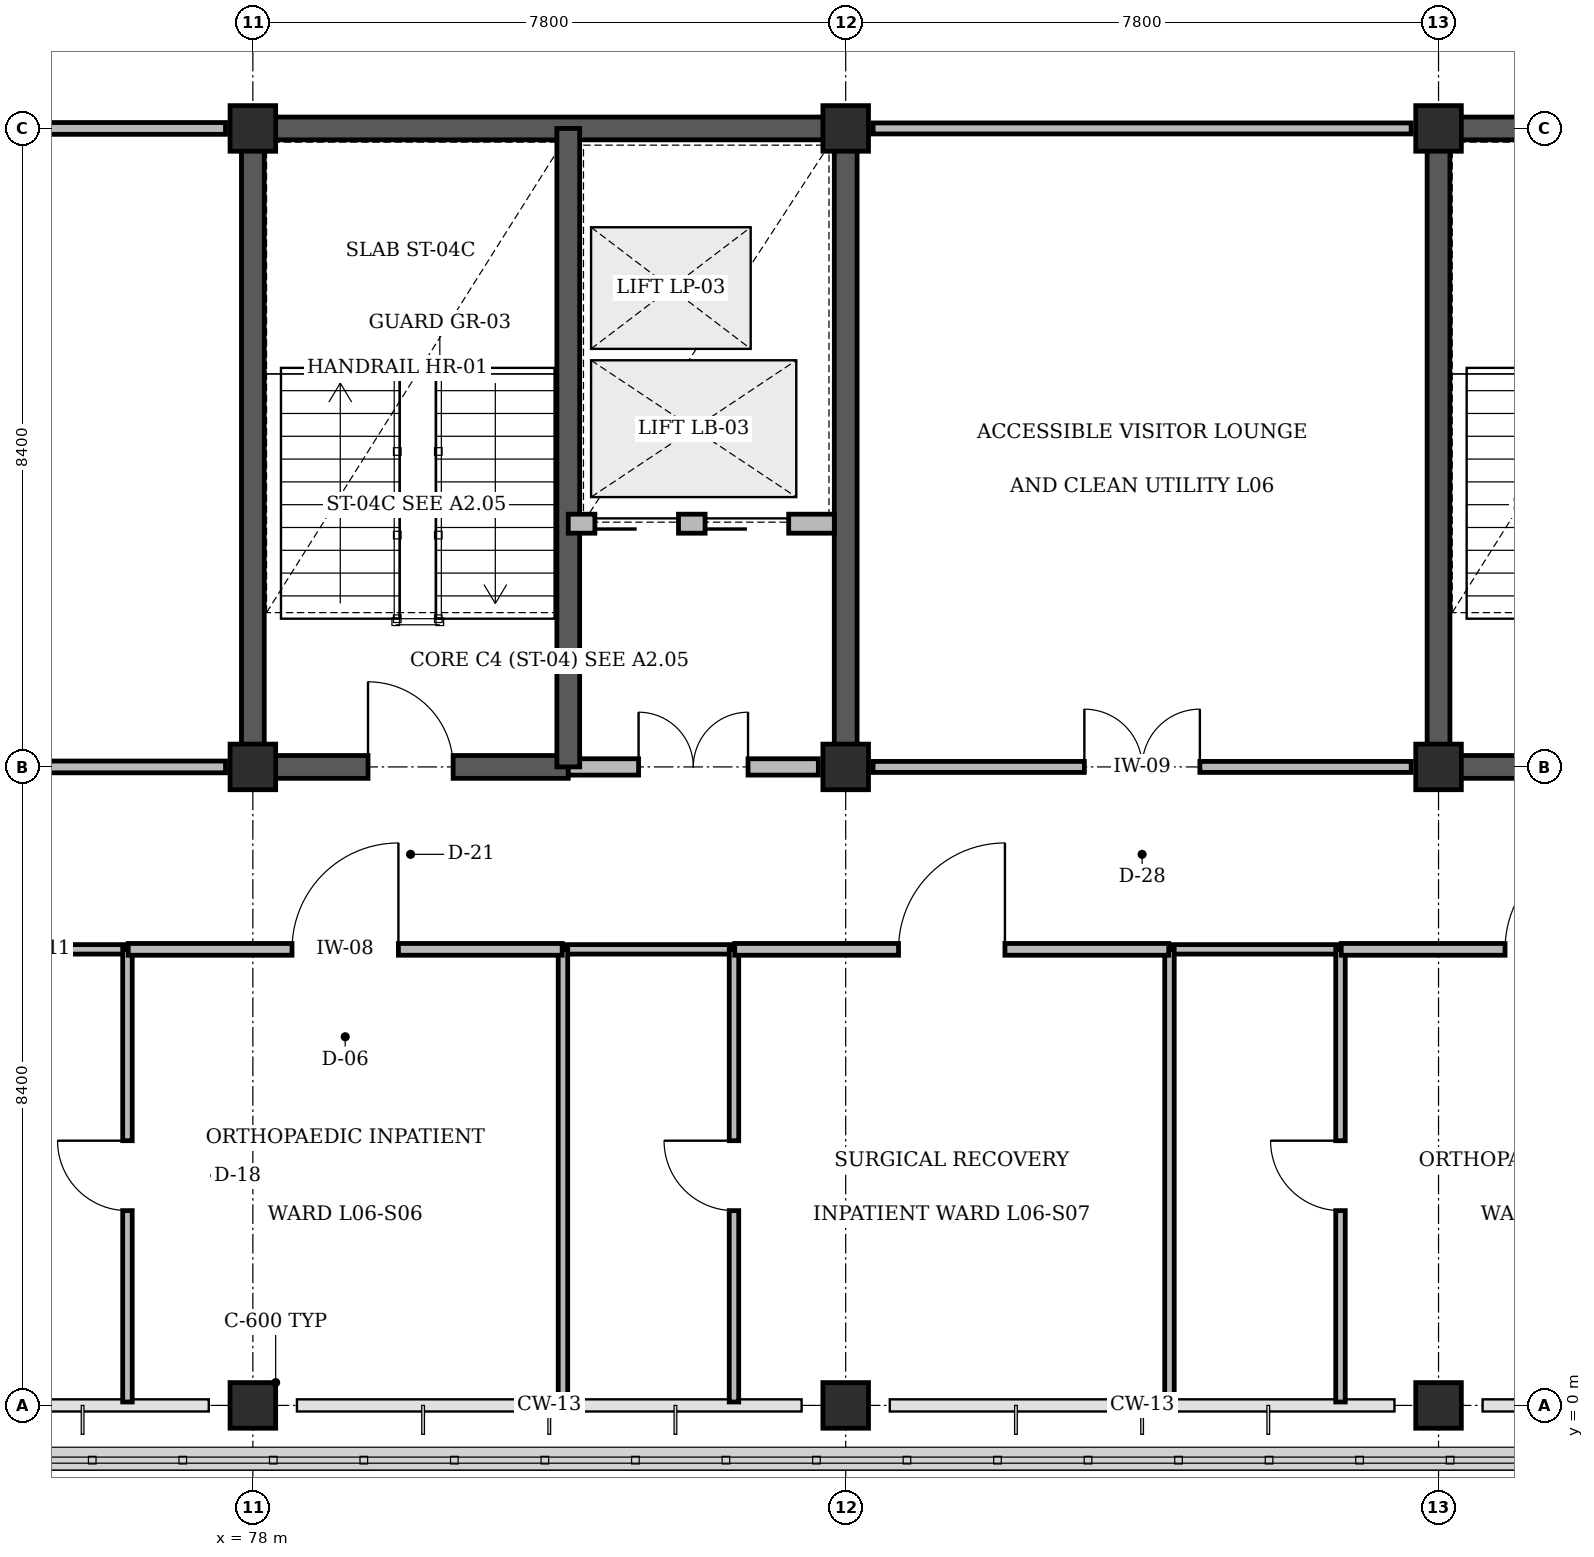
"""IFC4 building model, lengths in metres.
Left out: names, types, materials, properties, quantities, classifications, styles, units other than length and angle.
Written with IfcOpenShell. Run it as: python <this file> out.ifc"""

import sys

from ifc_helpers import new_model, si_unit, direction, frame, frame_2d, origin, origin_2d, place, context, subcontext, project, spatial, rectangle, extrude, element, fill, save


model = new_model("IFC4")
c1 = context("Model", 3, precision=1e-05, world=origin(), true_north=direction((0.0, 1.0)))
c2 = subcontext(c1, "Body", "Model", "MODEL_VIEW")
j1 = project(units=[si_unit("LENGTHUNIT", "METRE"), si_unit("PLANEANGLEUNIT", "RADIAN")], contexts=[c1])
p1 = place(None, origin())
s1 = spatial("IfcSite", under=j1, at=p1, CompositionType="ELEMENT")
p2 = place(p1, origin())
s2 = spatial("IfcBuilding", under=s1, at=p2, CompositionType="ELEMENT")
p3 = place(p2, frame((0.0, 0.0, 26.4)))
s3 = spatial("IfcBuildingStorey", under=s2, at=p3, CompositionType="ELEMENT", Elevation=26.4)
p4 = place(p3, frame((77.85, 16.8, 0.0), z_axis=(0.0, 0.0, 1.0), x_axis=(1.0, 0.0, 0.0)))
e1 = element("IfcWall", 1, at=p4, inside=s3, PredefinedType="SHEAR", context=c2, shape_type="SweptSolid", body=[
    extrude(rectangle(XDim=8.1, YDim=0.3, at=frame_2d((4.05, 0.0))), origin(), (0.0, 0.0, 1.0), 3.92),
])
for number, where, z_axis, x_axis in (
    (2, (78.0, 8.4, 0.0), (0.0, 0.0, 1.0), (0.0, 1.0, 0.0)),
    (3, (85.8, 8.4, 0.0), (0.0, 0.0, 1.0), (0.0, 1.0, 0.0)),
):
    element("IfcWall", number, at=place(p3, frame(where, z_axis=z_axis, x_axis=x_axis)), inside=s3, PredefinedType="SHEAR", context=c2, shape_type="SweptSolid", body=[
        extrude(rectangle(XDim=8.4, YDim=0.3, at=frame_2d((4.2, 0.0))), origin(), (0.0, 0.0, 1.0), 3.92),
    ])
p5 = place(p3, frame((93.45, 16.8, 0.0), z_axis=(0.0, 0.0, 1.0), x_axis=(1.0, 0.0, 0.0)))
e4 = element("IfcWall", 4, at=p5, inside=s3, PredefinedType="SHEAR", context=c2, shape_type="SweptSolid", body=[
    extrude(rectangle(XDim=8.1, YDim=0.3, at=frame_2d((4.05, 0.0))), origin(), (0.0, 0.0, 1.0), 3.92),
])
p6 = place(p3, frame((93.6, 8.4, 0.0), z_axis=(0.0, 0.0, 1.0), x_axis=(0.0, 1.0, 0.0)))
e5 = element("IfcWall", 5, at=p6, inside=s3, PredefinedType="SHEAR", context=c2, shape_type="SweptSolid", body=[
    extrude(rectangle(XDim=8.4, YDim=0.3, at=frame_2d((4.2, 0.0))), origin(), (0.0, 0.0, 1.0), 3.92),
])
for number, where, z_axis, x_axis in (
    (6, (78.0, 0.0, 0.0), (0.0, 0.0, 1.0), (1.0, 0.0, 0.0)),
    (7, (78.0, 8.4, 0.0), (0.0, 0.0, 1.0), (1.0, 0.0, 0.0)),
    (8, (78.0, 16.8, 0.0), (0.0, 0.0, 1.0), (1.0, 0.0, 0.0)),
    (9, (85.8, 0.0, 0.0), (0.0, 0.0, 1.0), (1.0, 0.0, 0.0)),
    (10, (85.8, 8.4, 0.0), (0.0, 0.0, 1.0), (1.0, 0.0, 0.0)),
    (11, (85.8, 16.8, 0.0), (0.0, 0.0, 1.0), (1.0, 0.0, 0.0)),
    (12, (93.6, 0.0, 0.0), (0.0, 0.0, 1.0), (1.0, 0.0, 0.0)),
    (13, (93.6, 8.4, 0.0), (0.0, 0.0, 1.0), (1.0, 0.0, 0.0)),
    (14, (93.6, 16.8, 0.0), (0.0, 0.0, 1.0), (1.0, 0.0, 0.0)),
):
    element("IfcColumn", number, at=place(p3, frame(where, z_axis=z_axis, x_axis=x_axis)), inside=s3, PredefinedType="COLUMN", context=c2, shape_type="SweptSolid", body=[
        extrude(rectangle(XDim=0.6, YDim=0.6, at=origin_2d()), origin(), (0.0, 0.0, 1.0), 4.2),
    ])
p7 = place(p3, frame((78.0, 8.4, 0.0), z_axis=(0.0, 0.0, 1.0), x_axis=(1.0, 0.0, 0.0)))
e15 = element("IfcWall", 15, at=p7, inside=s3, PredefinedType="SHEAR", context=c2, shape_type="SweptSolid", body=[
    extrude(rectangle(XDim=4.15, YDim=0.3, at=frame_2d((2.075, 0.0))), origin(), (0.0, 0.0, 1.0), 4.2),
])
p8 = place(p7, frame((1.515, 0.0, 0.0)))
e16 = element("IfcOpeningElement", 16, at=p8, cuts=e15, PredefinedType="OPENING", context=c2, shape_type="SweptSolid", body=[
    extrude(rectangle(XDim=1.12, YDim=2.15, at=frame_2d((0.56, 1.075))), frame((0.0, 0.16, 0.0), z_axis=(0.0, -1.0, 0.0), x_axis=(1.0, 0.0, 0.0)), (0.0, 0.0, 1.0), 0.32),
])
p9 = place(p3, frame((82.15, 8.4, 0.0), z_axis=(0.0, 0.0, 1.0), x_axis=(1.0, 0.0, 0.0)))
e17 = element("IfcWall", 17, at=p9, inside=s3, PredefinedType="STANDARD", context=c2, shape_type="SweptSolid", body=[
    extrude(rectangle(XDim=3.29, YDim=0.215, at=frame_2d((1.645, 0.0))), origin(), (0.0, 0.0, 1.0), 3.27),
])
p10 = place(p9, frame((0.925, 0.0, 0.0)))
e18 = element("IfcOpeningElement", 18, at=p10, cuts=e17, PredefinedType="OPENING", context=c2, shape_type="SweptSolid", body=[
    extrude(rectangle(XDim=1.44, YDim=2.2, at=frame_2d((0.72, 1.1))), frame((0.0, 0.118, 0.0), z_axis=(0.0, -1.0, 0.0), x_axis=(1.0, 0.0, 0.0)), (0.0, 0.0, 1.0), 0.235),
])
p11 = place(p3, frame((82.15, 8.4, 0.0), z_axis=(0.0, 0.0, 1.0), x_axis=(0.0, 1.0, 0.0)))
e19 = element("IfcWall", 19, at=p11, inside=s3, PredefinedType="SHEAR", context=c2, shape_type="SweptSolid", body=[
    extrude(rectangle(XDim=8.4, YDim=0.3, at=frame_2d((4.2, 0.0))), origin(), (0.0, 0.0, 1.0), 4.2),
])
p12 = place(p3, frame((82.15, 11.6, 0.0), z_axis=(0.0, 0.0, 1.0), x_axis=(1.0, 0.0, 0.0)))
e20 = element("IfcWall", 20, at=p12, inside=s3, PredefinedType="STANDARD", context=c2, shape_type="SweptSolid", body=[
    extrude(rectangle(XDim=3.5, YDim=0.25, at=frame_2d((1.75, 0.0))), origin(), (0.0, 0.0, 1.0), 3.9),
])
p13 = place(p12, frame((0.35, 0.0, 0.0)))
e21 = element("IfcOpeningElement", 21, at=p13, cuts=e20, PredefinedType="OPENING", context=c2, shape_type="SweptSolid", body=[
    extrude(rectangle(XDim=1.1, YDim=2.2, at=frame_2d((0.55, 1.1))), frame((0.0, 0.135, 0.0), z_axis=(0.0, -1.0, 0.0), x_axis=(1.0, 0.0, 0.0)), (0.0, 0.0, 1.0), 0.27),
])
p14 = place(p12, frame((1.8, 0.0, 0.0)))
e22 = element("IfcOpeningElement", 22, at=p14, cuts=e20, PredefinedType="OPENING", context=c2, shape_type="SweptSolid", body=[
    extrude(rectangle(XDim=1.1, YDim=2.2, at=frame_2d((0.55, 1.1))), frame((0.0, 0.135, 0.0), z_axis=(0.0, -1.0, 0.0), x_axis=(1.0, 0.0, 0.0)), (0.0, 0.0, 1.0), 0.27),
])
p15 = place(p3, frame((93.6, 8.4, 0.0), z_axis=(0.0, 0.0, 1.0), x_axis=(1.0, 0.0, 0.0)))
e23 = element("IfcWall", 23, at=p15, inside=s3, PredefinedType="SHEAR", context=c2, shape_type="SweptSolid", body=[
    extrude(rectangle(XDim=4.15, YDim=0.3, at=frame_2d((2.075, 0.0))), origin(), (0.0, 0.0, 1.0), 4.2),
])
p16 = place(p15, frame((1.515, 0.0, 0.0)))
e24 = element("IfcOpeningElement", 24, at=p16, cuts=e23, PredefinedType="OPENING", context=c2, shape_type="SweptSolid", body=[
    extrude(rectangle(XDim=1.12, YDim=2.15, at=frame_2d((0.56, 1.075))), frame((0.0, 0.16, 0.0), z_axis=(0.0, -1.0, 0.0), x_axis=(1.0, 0.0, 0.0)), (0.0, 0.0, 1.0), 0.32),
])
p17 = place(p3, frame((74.1, 6.0, 0.0), z_axis=(0.0, 0.0, 1.0), x_axis=(1.0, 0.0, 0.0)))
e25 = element("IfcWall", 25, at=p17, inside=s3, PredefinedType="PARTITIONING", context=c2, shape_type="SweptSolid", body=[
    extrude(rectangle(XDim=2.25, YDim=0.125, at=frame_2d((1.125, 0.0))), origin(), (0.0, 0.0, 1.0), 3.9),
])
p18 = place(p3, frame((76.35, 0.045, 0.0), z_axis=(0.0, 0.0, 1.0), x_axis=(0.0, 1.0, 0.0)))
e26 = element("IfcWall", 26, at=p18, inside=s3, PredefinedType="PARTITIONING", context=c2, shape_type="SweptSolid", body=[
    extrude(rectangle(XDim=5.955, YDim=0.125, at=frame_2d((2.978, 0.0))), origin(), (0.0, 0.0, 1.0), 3.9),
])
p19 = place(p18, frame((2.518, 0.0, 0.0)))
e27 = element("IfcOpeningElement", 27, at=p19, cuts=e26, PredefinedType="OPENING", context=c2, shape_type="SweptSolid", body=[
    extrude(rectangle(XDim=0.92, YDim=2.1, at=frame_2d((0.46, 1.05))), frame((0.0, 0.073, 0.0), z_axis=(0.0, -1.0, 0.0), x_axis=(1.0, 0.0, 0.0)), (0.0, 0.0, 1.0), 0.145),
])
p20 = place(p3, frame((82.08, 6.0, 0.0), z_axis=(0.0, 0.0, 1.0), x_axis=(1.0, 0.0, 0.0)))
e28 = element("IfcWall", 28, at=p20, inside=s3, PredefinedType="PARTITIONING", context=c2, shape_type="SweptSolid", body=[
    extrude(rectangle(XDim=2.25, YDim=0.125, at=frame_2d((1.125, 0.0))), origin(), (0.0, 0.0, 1.0), 3.9),
])
p21 = place(p3, frame((82.08, 0.045, 0.0), z_axis=(0.0, 0.0, 1.0), x_axis=(0.0, 1.0, 0.0)))
e29 = element("IfcWall", 29, at=p21, inside=s3, PredefinedType="PARTITIONING", context=c2, shape_type="SweptSolid", body=[
    extrude(rectangle(XDim=5.955, YDim=0.125, at=frame_2d((2.978, 0.0))), origin(), (0.0, 0.0, 1.0), 3.9),
])
p22 = place(p3, frame((84.33, 0.045, 0.0), z_axis=(0.0, 0.0, 1.0), x_axis=(0.0, 1.0, 0.0)))
e30 = element("IfcWall", 30, at=p22, inside=s3, PredefinedType="PARTITIONING", context=c2, shape_type="SweptSolid", body=[
    extrude(rectangle(XDim=5.955, YDim=0.125, at=frame_2d((2.978, 0.0))), origin(), (0.0, 0.0, 1.0), 3.9),
])
p23 = place(p22, frame((2.518, 0.0, 0.0)))
e31 = element("IfcOpeningElement", 31, at=p23, cuts=e30, PredefinedType="OPENING", context=c2, shape_type="SweptSolid", body=[
    extrude(rectangle(XDim=0.92, YDim=2.1, at=frame_2d((0.46, 1.05))), frame((0.0, 0.073, 0.0), z_axis=(0.0, -1.0, 0.0), x_axis=(1.0, 0.0, 0.0)), (0.0, 0.0, 1.0), 0.145),
])
p24 = place(p3, frame((90.06, 6.0, 0.0), z_axis=(0.0, 0.0, 1.0), x_axis=(1.0, 0.0, 0.0)))
e32 = element("IfcWall", 32, at=p24, inside=s3, PredefinedType="PARTITIONING", context=c2, shape_type="SweptSolid", body=[
    extrude(rectangle(XDim=2.25, YDim=0.125, at=frame_2d((1.125, 0.0))), origin(), (0.0, 0.0, 1.0), 3.9),
])
p25 = place(p3, frame((90.06, 0.045, 0.0), z_axis=(0.0, 0.0, 1.0), x_axis=(0.0, 1.0, 0.0)))
e33 = element("IfcWall", 33, at=p25, inside=s3, PredefinedType="PARTITIONING", context=c2, shape_type="SweptSolid", body=[
    extrude(rectangle(XDim=5.955, YDim=0.125, at=frame_2d((2.978, 0.0))), origin(), (0.0, 0.0, 1.0), 3.9),
])
p26 = place(p3, frame((92.31, 0.045, 0.0), z_axis=(0.0, 0.0, 1.0), x_axis=(0.0, 1.0, 0.0)))
e34 = element("IfcWall", 34, at=p26, inside=s3, PredefinedType="PARTITIONING", context=c2, shape_type="SweptSolid", body=[
    extrude(rectangle(XDim=5.955, YDim=0.125, at=frame_2d((2.978, 0.0))), origin(), (0.0, 0.0, 1.0), 3.9),
])
p27 = place(p26, frame((2.518, 0.0, 0.0)))
e35 = element("IfcOpeningElement", 35, at=p27, cuts=e34, PredefinedType="OPENING", context=c2, shape_type="SweptSolid", body=[
    extrude(rectangle(XDim=0.92, YDim=2.1, at=frame_2d((0.46, 1.05))), frame((0.0, 0.073, 0.0), z_axis=(0.0, -1.0, 0.0), x_axis=(1.0, 0.0, 0.0)), (0.0, 0.0, 1.0), 0.145),
])
p28 = place(p3, frame((76.36, 6.0, 0.0), z_axis=(0.0, 0.0, 1.0), x_axis=(1.0, 0.0, 0.0)))
e36 = element("IfcWall", 36, at=p28, inside=s3, PredefinedType="PARTITIONING", context=c2, shape_type="SweptSolid", body=[
    extrude(rectangle(XDim=5.71, YDim=0.155, at=frame_2d((2.855, 0.0))), origin(), (0.0, 0.0, 1.0), 3.9),
])
p29 = place(p28, frame((2.155, 0.0, 0.0)))
e37 = element("IfcOpeningElement", 37, at=p29, cuts=e36, PredefinedType="OPENING", context=c2, shape_type="SweptSolid", body=[
    extrude(rectangle(XDim=1.4, YDim=2.2, at=frame_2d((0.7, 1.1))), frame((0.0, 0.087, 0.0), z_axis=(0.0, -1.0, 0.0), x_axis=(1.0, 0.0, 0.0)), (0.0, 0.0, 1.0), 0.175),
])
p30 = place(p3, frame((84.34, 6.0, 0.0), z_axis=(0.0, 0.0, 1.0), x_axis=(1.0, 0.0, 0.0)))
e38 = element("IfcWall", 38, at=p30, inside=s3, PredefinedType="PARTITIONING", context=c2, shape_type="SweptSolid", body=[
    extrude(rectangle(XDim=5.71, YDim=0.155, at=frame_2d((2.855, 0.0))), origin(), (0.0, 0.0, 1.0), 3.9),
])
p31 = place(p30, frame((2.155, 0.0, 0.0)))
e39 = element("IfcOpeningElement", 39, at=p31, cuts=e38, PredefinedType="OPENING", context=c2, shape_type="SweptSolid", body=[
    extrude(rectangle(XDim=1.4, YDim=2.2, at=frame_2d((0.7, 1.1))), frame((0.0, 0.087, 0.0), z_axis=(0.0, -1.0, 0.0), x_axis=(1.0, 0.0, 0.0)), (0.0, 0.0, 1.0), 0.175),
])
p32 = place(p3, frame((92.32, 6.0, 0.0), z_axis=(0.0, 0.0, 1.0), x_axis=(1.0, 0.0, 0.0)))
e40 = element("IfcWall", 40, at=p32, inside=s3, PredefinedType="PARTITIONING", context=c2, shape_type="SweptSolid", body=[
    extrude(rectangle(XDim=5.71, YDim=0.155, at=frame_2d((2.855, 0.0))), origin(), (0.0, 0.0, 1.0), 3.9),
])
p33 = place(p32, frame((2.155, 0.0, 0.0)))
e41 = element("IfcOpeningElement", 41, at=p33, cuts=e40, PredefinedType="OPENING", context=c2, shape_type="SweptSolid", body=[
    extrude(rectangle(XDim=1.4, YDim=2.2, at=frame_2d((0.7, 1.1))), frame((0.0, 0.087, 0.0), z_axis=(0.0, -1.0, 0.0), x_axis=(1.0, 0.0, 0.0)), (0.0, 0.0, 1.0), 0.175),
])
for number, where, z_axis, x_axis in (
    (42, (73.2, 8.4, 0.0), (0.0, 0.0, 1.0), (1.0, 0.0, 0.0)),
    (43, (73.2, 16.8, 0.0), (0.0, 0.0, 1.0), (1.0, 0.0, 0.0)),
):
    element("IfcWall", number, at=place(p3, frame(where, z_axis=z_axis, x_axis=x_axis)), inside=s3, PredefinedType="PARTITIONING", context=c2, shape_type="SweptSolid", body=[
        extrude(rectangle(XDim=4.44, YDim=0.155, at=frame_2d((2.22, 0.0))), origin(), (0.0, 0.0, 1.0), 3.27),
    ])
p34 = place(p3, frame((86.16, 8.4, 0.0), z_axis=(0.0, 0.0, 1.0), x_axis=(1.0, 0.0, 0.0)))
e44 = element("IfcWall", 44, at=p34, inside=s3, PredefinedType="PARTITIONING", context=c2, shape_type="SweptSolid", body=[
    extrude(rectangle(XDim=7.08, YDim=0.145, at=frame_2d((3.54, 0.0))), origin(), (0.0, 0.0, 1.0), 3.27),
])
p35 = place(p34, frame((2.78, 0.0, 0.0)))
e45 = element("IfcOpeningElement", 45, at=p35, cuts=e44, PredefinedType="OPENING", context=c2, shape_type="SweptSolid", body=[
    extrude(rectangle(XDim=1.52, YDim=2.2, at=frame_2d((0.76, 1.1))), frame((0.0, 0.083, 0.0), z_axis=(0.0, -1.0, 0.0), x_axis=(1.0, 0.0, 0.0)), (0.0, 0.0, 1.0), 0.165),
])
p36 = place(p3, frame((86.16, 16.8, 0.0), z_axis=(0.0, 0.0, 1.0), x_axis=(1.0, 0.0, 0.0)))
e46 = element("IfcWall", 46, at=p36, inside=s3, PredefinedType="PARTITIONING", context=c2, shape_type="SweptSolid", body=[
    extrude(rectangle(XDim=7.08, YDim=0.145, at=frame_2d((3.54, 0.0))), origin(), (0.0, 0.0, 1.0), 3.27),
])
p37 = place(p8, origin())
e47 = element("IfcDoor", 47, at=p37, inside=s3, OperationType="SINGLE_SWING_LEFT", PredefinedType="DOOR", context=c2, shape_type="SweptSolid", body=[
    extrude(rectangle(XDim=1.12, YDim=2.15, at=frame_2d((0.56, 1.075))), frame((0.0, 0.025, 0.0), z_axis=(0.0, -1.0, 0.0), x_axis=(1.0, 0.0, 0.0)), (0.0, 0.0, 1.0), 0.05),
])
fill(e16, e47)
p38 = place(p10, origin())
e48 = element("IfcDoor", 48, at=p38, inside=s3, OperationType="DOUBLE_DOOR_SINGLE_SWING", PredefinedType="DOOR", context=c2, shape_type="SweptSolid", body=[
    extrude(rectangle(XDim=1.44, YDim=2.2, at=frame_2d((0.72, 1.1))), frame((0.0, 0.025, 0.0), z_axis=(0.0, -1.0, 0.0), x_axis=(1.0, 0.0, 0.0)), (0.0, 0.0, 1.0), 0.05),
])
fill(e18, e48)
p39 = place(p13, origin())
e49 = element("IfcDoor", 49, at=p39, inside=s3, OperationType="SLIDING_TO_LEFT", PredefinedType="DOOR", context=c2, shape_type="SweptSolid", body=[
    extrude(rectangle(XDim=1.1, YDim=2.2, at=frame_2d((0.55, 1.1))), frame((0.0, 0.025, 0.0), z_axis=(0.0, -1.0, 0.0), x_axis=(1.0, 0.0, 0.0)), (0.0, 0.0, 1.0), 0.05),
])
fill(e21, e49)
p40 = place(p14, origin())
e50 = element("IfcDoor", 50, at=p40, inside=s3, OperationType="SLIDING_TO_LEFT", PredefinedType="DOOR", context=c2, shape_type="SweptSolid", body=[
    extrude(rectangle(XDim=1.1, YDim=2.2, at=frame_2d((0.55, 1.1))), frame((0.0, 0.025, 0.0), z_axis=(0.0, -1.0, 0.0), x_axis=(1.0, 0.0, 0.0)), (0.0, 0.0, 1.0), 0.05),
])
fill(e22, e50)
p41 = place(p19, origin())
e51 = element("IfcDoor", 51, at=p41, inside=s3, OperationType="SINGLE_SWING_RIGHT", PredefinedType="DOOR", context=c2, shape_type="SweptSolid", body=[
    extrude(rectangle(XDim=0.92, YDim=2.1, at=frame_2d((0.46, 1.05))), frame((0.0, 0.025, 0.0), z_axis=(0.0, -1.0, 0.0), x_axis=(1.0, 0.0, 0.0)), (0.0, 0.0, 1.0), 0.05),
])
fill(e27, e51)
p42 = place(p23, origin())
e52 = element("IfcDoor", 52, at=p42, inside=s3, OperationType="SINGLE_SWING_RIGHT", PredefinedType="DOOR", context=c2, shape_type="SweptSolid", body=[
    extrude(rectangle(XDim=0.92, YDim=2.1, at=frame_2d((0.46, 1.05))), frame((0.0, 0.025, 0.0), z_axis=(0.0, -1.0, 0.0), x_axis=(1.0, 0.0, 0.0)), (0.0, 0.0, 1.0), 0.05),
])
fill(e31, e52)
p43 = place(p27, origin())
e53 = element("IfcDoor", 53, at=p43, inside=s3, OperationType="SINGLE_SWING_RIGHT", PredefinedType="DOOR", context=c2, shape_type="SweptSolid", body=[
    extrude(rectangle(XDim=0.92, YDim=2.1, at=frame_2d((0.46, 1.05))), frame((0.0, 0.025, 0.0), z_axis=(0.0, -1.0, 0.0), x_axis=(1.0, 0.0, 0.0)), (0.0, 0.0, 1.0), 0.05),
])
fill(e35, e53)
p44 = place(p29, origin())
e54 = element("IfcDoor", 54, at=p44, inside=s3, OperationType="SINGLE_SWING_RIGHT", PredefinedType="DOOR", context=c2, shape_type="SweptSolid", body=[
    extrude(rectangle(XDim=1.4, YDim=2.2, at=frame_2d((0.7, 1.1))), frame((0.0, 0.025, 0.0), z_axis=(0.0, -1.0, 0.0), x_axis=(1.0, 0.0, 0.0)), (0.0, 0.0, 1.0), 0.05),
])
fill(e37, e54)
p45 = place(p31, origin())
e55 = element("IfcDoor", 55, at=p45, inside=s3, OperationType="SINGLE_SWING_RIGHT", PredefinedType="DOOR", context=c2, shape_type="SweptSolid", body=[
    extrude(rectangle(XDim=1.4, YDim=2.2, at=frame_2d((0.7, 1.1))), frame((0.0, 0.025, 0.0), z_axis=(0.0, -1.0, 0.0), x_axis=(1.0, 0.0, 0.0)), (0.0, 0.0, 1.0), 0.05),
])
fill(e39, e55)
p46 = place(p33, origin())
e56 = element("IfcDoor", 56, at=p46, inside=s3, OperationType="SINGLE_SWING_RIGHT", PredefinedType="DOOR", context=c2, shape_type="SweptSolid", body=[
    extrude(rectangle(XDim=1.4, YDim=2.2, at=frame_2d((0.7, 1.1))), frame((0.0, 0.025, 0.0), z_axis=(0.0, -1.0, 0.0), x_axis=(1.0, 0.0, 0.0)), (0.0, 0.0, 1.0), 0.05),
])
fill(e41, e56)
p47 = place(p35, origin())
e57 = element("IfcDoor", 57, at=p47, inside=s3, OperationType="DOUBLE_DOOR_SINGLE_SWING", PredefinedType="DOOR", context=c2, shape_type="SweptSolid", body=[
    extrude(rectangle(XDim=1.52, YDim=2.2, at=frame_2d((0.76, 1.1))), frame((0.0, 0.025, 0.0), z_axis=(0.0, -1.0, 0.0), x_axis=(1.0, 0.0, 0.0)), (0.0, 0.0, 1.0), 0.05),
])
fill(e45, e57)
save(model, sys.argv[1])
